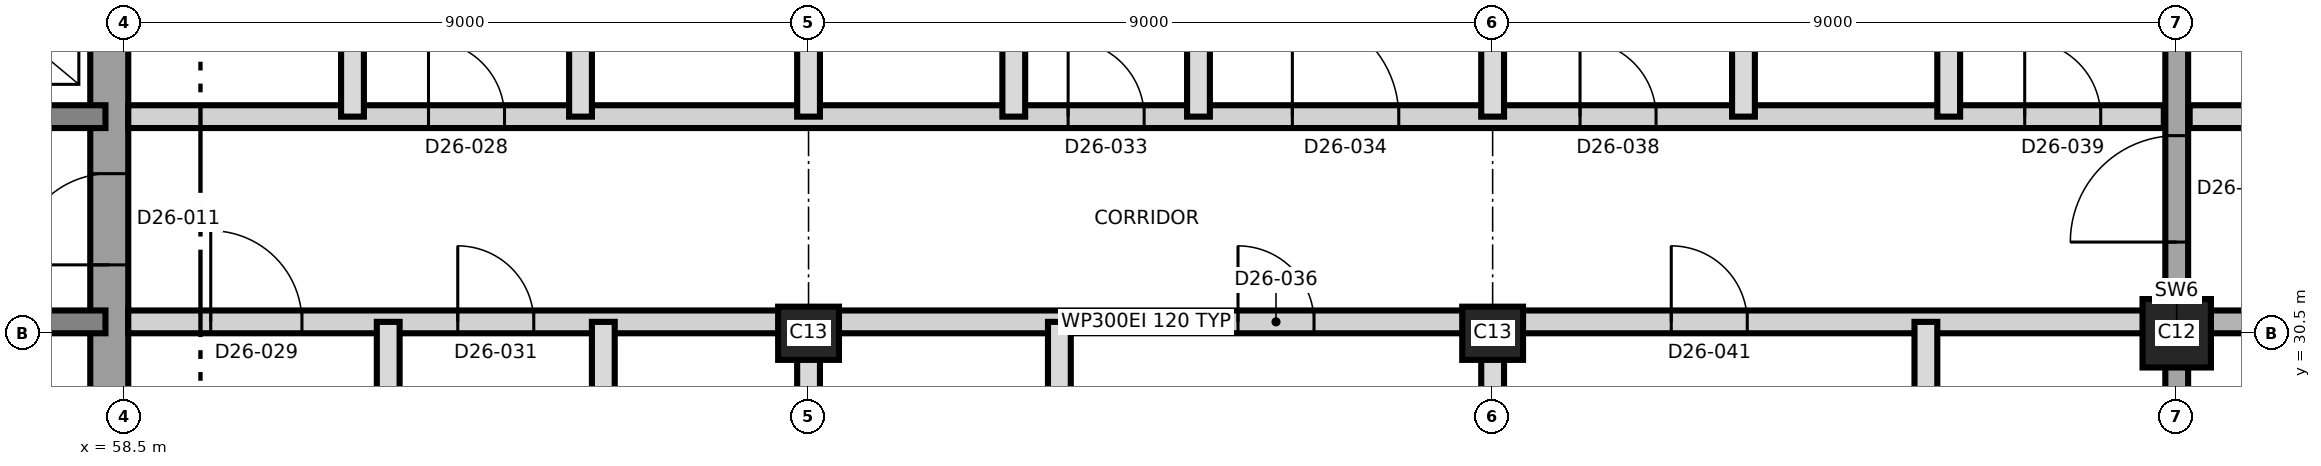
"""IFC4 building model, lengths in metres.
Left out: names, types, materials, properties, quantities, classifications, styles, units other than length and angle.
Written with IfcOpenShell. Run it as: python <this file> out.ifc"""

import sys

from ifc_helpers import new_model, si_unit, direction, frame, frame_2d, origin, origin_2d, place, context, subcontext, project, spatial, rectangle, extrude, element, fill, save


model = new_model("IFC4")
c1 = context("Model", 3, precision=1e-05, world=origin(), true_north=direction((0.0, 1.0)))
c2 = subcontext(c1, "Body", "Model", "MODEL_VIEW")
j1 = project(units=[si_unit("LENGTHUNIT", "METRE"), si_unit("PLANEANGLEUNIT", "RADIAN")], contexts=[c1])
p1 = place(None, origin())
s1 = spatial("IfcSite", under=j1, at=p1, CompositionType="ELEMENT")
p2 = place(p1, origin())
s2 = spatial("IfcBuilding", under=s1, at=p2, CompositionType="ELEMENT")
p3 = place(p2, frame((0.0, 0.0, 232.8)))
s3 = spatial("IfcBuildingStorey", under=s2, at=p3, CompositionType="ELEMENT", Elevation=232.8)
p4 = place(p3, frame((58.3, 21.25, 0.0), z_axis=(0.0, 0.0, 1.0), x_axis=(0.0, 1.0, 0.0)))
e1 = element("IfcWall", 1, at=p4, inside=s3, PredefinedType="SHEAR", context=c2, shape_type="SweptSolid", body=[
    extrude(rectangle(XDim=18.5, YDim=0.5, at=frame_2d((9.25, 0.0))), origin(), (0.0, 0.0, 1.0), 3.7),
])
p5 = place(p4, frame((10.15, 0.0, 0.0)))
e2 = element("IfcOpeningElement", 2, at=p5, cuts=e1, PredefinedType="OPENING", context=c2, shape_type="SweptSolid", body=[
    extrude(rectangle(XDim=1.2, YDim=2.1, at=frame_2d((0.6, 1.05))), frame((0.0, 0.26, 0.0), z_axis=(0.0, -1.0, 0.0), x_axis=(1.0, 0.0, 0.0)), (0.0, 0.0, 1.0), 0.52),
])
p6 = place(p3, frame((31.75, 30.65, 0.0), z_axis=(0.0, 0.0, 1.0), x_axis=(1.0, 0.0, 0.0)))
e3 = element("IfcWall", 3, at=p6, inside=s3, PredefinedType="SHEAR", context=c2, shape_type="SweptSolid", body=[
    extrude(rectangle(XDim=26.5, YDim=0.3, at=frame_2d((13.25, 0.0))), origin(), (0.0, 0.0, 1.0), 3.7),
])
p7 = place(p6, frame((24.75, 0.0, 0.0)))
e4 = element("IfcOpeningElement", 4, at=p7, cuts=e3, PredefinedType="OPENING", context=c2, shape_type="SweptSolid", body=[
    extrude(rectangle(XDim=1.0, YDim=2.1, at=frame_2d((0.5, 1.05))), frame((0.0, 0.16, 0.0), z_axis=(0.0, -1.0, 0.0), x_axis=(1.0, 0.0, 0.0)), (0.0, 0.0, 1.0), 0.32),
])
p8 = place(p3, frame((31.75, 33.35, 0.0), z_axis=(0.0, 0.0, 1.0), x_axis=(1.0, 0.0, 0.0)))
e5 = element("IfcWall", 5, at=p8, inside=s3, PredefinedType="SHEAR", context=c2, shape_type="SweptSolid", body=[
    extrude(rectangle(XDim=26.5, YDim=0.3, at=frame_2d((13.25, 0.0))), origin(), (0.0, 0.0, 1.0), 3.7),
])
p9 = place(p8, frame((13.9, 0.0, 0.0)))
e6 = element("IfcOpeningElement", 6, at=p9, cuts=e5, PredefinedType="OPENING", context=c2, shape_type="SweptSolid", body=[
    extrude(rectangle(XDim=1.4, YDim=2.1, at=frame_2d((0.7, 1.05))), frame((0.0, 0.16, 0.0), z_axis=(0.0, -1.0, 0.0), x_axis=(1.0, 0.0, 0.0)), (0.0, 0.0, 1.0), 0.32),
])
p10 = place(p8, frame((5.375, 0.0, 0.0)))
e7 = element("IfcOpeningElement", 7, at=p10, cuts=e5, PredefinedType="OPENING", context=c2, shape_type="SweptSolid", body=[
    extrude(rectangle(XDim=1.2, YDim=2.1, at=frame_2d((0.6, 1.05))), frame((0.0, 0.16, 0.0), z_axis=(0.0, -1.0, 0.0), x_axis=(1.0, 0.0, 0.0)), (0.0, 0.0, 1.0), 0.32),
])
p11 = place(p8, frame((19.925, 0.0, 0.0)))
e8 = element("IfcOpeningElement", 8, at=p11, cuts=e5, PredefinedType="OPENING", context=c2, shape_type="SweptSolid", body=[
    extrude(rectangle(XDim=1.2, YDim=2.1, at=frame_2d((0.6, 1.05))), frame((0.0, 0.16, 0.0), z_axis=(0.0, -1.0, 0.0), x_axis=(1.0, 0.0, 0.0)), (0.0, 0.0, 1.0), 0.32),
])
for number, where, z_axis, x_axis in (
    (9, (67.5, 30.5, 0.0), (0.0, 0.0, 1.0), (1.0, 0.0, 0.0)),
    (10, (76.5, 30.5, 0.0), (0.0, 0.0, 1.0), (1.0, 0.0, 0.0)),
):
    element("IfcColumn", number, at=place(p3, frame(where, z_axis=z_axis, x_axis=x_axis)), inside=s3, PredefinedType="COLUMN", context=c2, shape_type="SweptSolid", body=[
        extrude(rectangle(XDim=0.8, YDim=0.7, at=origin_2d()), origin(), (0.0, 0.0, 1.0), 3.7),
    ])
p12 = place(p3, frame((85.5, 30.5, 0.0), z_axis=(0.0, 0.0, 1.0), x_axis=(1.0, 0.0, 0.0)))
e11 = element("IfcColumn", 11, at=p12, inside=s3, PredefinedType="COLUMN", context=c2, shape_type="SweptSolid", body=[
    extrude(rectangle(XDim=0.9, YDim=0.9, at=origin_2d()), origin(), (0.0, 0.0, 1.0), 3.7),
])
p13 = place(p3, frame((85.5, 19.275, 0.0), z_axis=(0.0, 0.0, 1.0), x_axis=(0.0, 1.0, 0.0)))
e12 = element("IfcWall", 12, at=p13, inside=s3, PredefinedType="SHEAR", context=c2, shape_type="SweptSolid", body=[
    extrude(rectangle(XDim=22.45, YDim=0.3, at=frame_2d((11.225, 0.0))), origin(), (0.0, 0.0, 1.0), 3.7),
])
p14 = place(p13, frame((12.425, 0.0, 0.0)))
e13 = element("IfcOpeningElement", 13, at=p14, cuts=e12, PredefinedType="OPENING", context=c2, shape_type="SweptSolid", body=[
    extrude(rectangle(XDim=1.4, YDim=2.1, at=frame_2d((0.7, 1.05))), frame((0.0, 0.16, 0.0), z_axis=(0.0, -1.0, 0.0), x_axis=(1.0, 0.0, 0.0)), (0.0, 0.0, 1.0), 0.32),
])
p15 = place(p3, frame((58.55, 30.65, 0.0), z_axis=(0.0, 0.0, 1.0), x_axis=(1.0, 0.0, 0.0)))
e14 = element("IfcWall", 14, at=p15, inside=s3, PredefinedType="PARTITIONING", context=c2, shape_type="SweptSolid", body=[
    extrude(rectangle(XDim=26.78, YDim=0.3, at=frame_2d((13.39, 0.0))), origin(), (0.0, 0.0, 1.0), 3.4),
])
p16 = place(p15, frame((1.085, 0.0, 0.0)))
e15 = element("IfcOpeningElement", 15, at=p16, cuts=e14, PredefinedType="OPENING", context=c2, shape_type="SweptSolid", body=[
    extrude(rectangle(XDim=1.2, YDim=2.1, at=frame_2d((0.6, 1.05))), frame((0.0, 0.16, 0.0), z_axis=(0.0, -1.0, 0.0), x_axis=(1.0, 0.0, 0.0)), (0.0, 0.0, 1.0), 0.32),
])
p17 = place(p15, frame((4.335, 0.0, 0.0)))
e16 = element("IfcOpeningElement", 16, at=p17, cuts=e14, PredefinedType="OPENING", context=c2, shape_type="SweptSolid", body=[
    extrude(rectangle(XDim=1.0, YDim=2.1, at=frame_2d((0.5, 1.05))), frame((0.0, 0.16, 0.0), z_axis=(0.0, -1.0, 0.0), x_axis=(1.0, 0.0, 0.0)), (0.0, 0.0, 1.0), 0.32),
])
p18 = place(p15, frame((14.6, 0.0, 0.0)))
e17 = element("IfcOpeningElement", 17, at=p18, cuts=e14, PredefinedType="OPENING", context=c2, shape_type="SweptSolid", body=[
    extrude(rectangle(XDim=1.0, YDim=2.4, at=frame_2d((0.5, 1.2))), frame((0.0, 0.16, 0.0), z_axis=(0.0, -1.0, 0.0), x_axis=(1.0, 0.0, 0.0)), (0.0, 0.0, 1.0), 0.32),
])
p19 = place(p15, frame((20.3, 0.0, 0.0)))
e18 = element("IfcOpeningElement", 18, at=p19, cuts=e14, PredefinedType="OPENING", context=c2, shape_type="SweptSolid", body=[
    extrude(rectangle(XDim=1.0, YDim=2.4, at=frame_2d((0.5, 1.2))), frame((0.0, 0.16, 0.0), z_axis=(0.0, -1.0, 0.0), x_axis=(1.0, 0.0, 0.0)), (0.0, 0.0, 1.0), 0.32),
])
p20 = place(p3, frame((85.67, 30.65, 0.0), z_axis=(0.0, 0.0, 1.0), x_axis=(1.0, 0.0, 0.0)))
e19 = element("IfcWall", 19, at=p20, inside=s3, PredefinedType="SHEAR", context=c2, shape_type="SweptSolid", body=[
    extrude(rectangle(XDim=9.58, YDim=0.3, at=frame_2d((4.79, 0.0))), origin(), (0.0, 0.0, 1.0), 3.4),
])
p21 = place(p20, frame((2.08, 0.0, 0.0)))
e20 = element("IfcOpeningElement", 20, at=p21, cuts=e19, PredefinedType="OPENING", context=c2, shape_type="SweptSolid", body=[
    extrude(rectangle(XDim=1.2, YDim=2.1, at=frame_2d((0.6, 1.05))), frame((0.0, 0.16, 0.0), z_axis=(0.0, -1.0, 0.0), x_axis=(1.0, 0.0, 0.0)), (0.0, 0.0, 1.0), 0.32),
])
p22 = place(p20, frame((5.63, 0.0, 0.0)))
e21 = element("IfcOpeningElement", 21, at=p22, cuts=e19, PredefinedType="OPENING", context=c2, shape_type="SweptSolid", body=[
    extrude(rectangle(XDim=1.0, YDim=2.1, at=frame_2d((0.5, 1.05))), frame((0.0, 0.16, 0.0), z_axis=(0.0, -1.0, 0.0), x_axis=(1.0, 0.0, 0.0)), (0.0, 0.0, 1.0), 0.32),
])
p23 = place(p3, frame((58.55, 33.35, 0.0), z_axis=(0.0, 0.0, 1.0), x_axis=(1.0, 0.0, 0.0)))
e22 = element("IfcWall", 22, at=p23, inside=s3, PredefinedType="PARTITIONING", context=c2, shape_type="SweptSolid", body=[
    extrude(rectangle(XDim=26.78, YDim=0.3, at=frame_2d((13.39, 0.0))), origin(), (0.0, 0.0, 1.0), 3.4),
])
p24 = place(p23, frame((3.95, 0.0, 0.0)))
e23 = element("IfcOpeningElement", 23, at=p24, cuts=e22, PredefinedType="OPENING", context=c2, shape_type="SweptSolid", body=[
    extrude(rectangle(XDim=1.0, YDim=2.4, at=frame_2d((0.5, 1.2))), frame((0.0, 0.16, 0.0), z_axis=(0.0, -1.0, 0.0), x_axis=(1.0, 0.0, 0.0)), (0.0, 0.0, 1.0), 0.32),
])
p25 = place(p23, frame((12.365, 0.0, 0.0)))
e24 = element("IfcOpeningElement", 24, at=p25, cuts=e22, PredefinedType="OPENING", context=c2, shape_type="SweptSolid", body=[
    extrude(rectangle(XDim=1.0, YDim=2.1, at=frame_2d((0.5, 1.05))), frame((0.0, 0.16, 0.0), z_axis=(0.0, -1.0, 0.0), x_axis=(1.0, 0.0, 0.0)), (0.0, 0.0, 1.0), 0.32),
])
p26 = place(p23, frame((15.315, 0.0, 0.0)))
e25 = element("IfcOpeningElement", 25, at=p26, cuts=e22, PredefinedType="OPENING", context=c2, shape_type="SweptSolid", body=[
    extrude(rectangle(XDim=1.4, YDim=2.1, at=frame_2d((0.7, 1.05))), frame((0.0, 0.16, 0.0), z_axis=(0.0, -1.0, 0.0), x_axis=(1.0, 0.0, 0.0)), (0.0, 0.0, 1.0), 0.32),
])
p27 = place(p23, frame((19.1, 0.0, 0.0)))
e26 = element("IfcOpeningElement", 26, at=p27, cuts=e22, PredefinedType="OPENING", context=c2, shape_type="SweptSolid", body=[
    extrude(rectangle(XDim=1.0, YDim=2.1, at=frame_2d((0.5, 1.05))), frame((0.0, 0.16, 0.0), z_axis=(0.0, -1.0, 0.0), x_axis=(1.0, 0.0, 0.0)), (0.0, 0.0, 1.0), 0.32),
])
p28 = place(p23, frame((24.95, 0.0, 0.0)))
e27 = element("IfcOpeningElement", 27, at=p28, cuts=e22, PredefinedType="OPENING", context=c2, shape_type="SweptSolid", body=[
    extrude(rectangle(XDim=1.0, YDim=2.1, at=frame_2d((0.5, 1.05))), frame((0.0, 0.16, 0.0), z_axis=(0.0, -1.0, 0.0), x_axis=(1.0, 0.0, 0.0)), (0.0, 0.0, 1.0), 0.32),
])
p29 = place(p3, frame((85.67, 33.35, 0.0), z_axis=(0.0, 0.0, 1.0), x_axis=(1.0, 0.0, 0.0)))
e28 = element("IfcWall", 28, at=p29, inside=s3, PredefinedType="PARTITIONING", context=c2, shape_type="SweptSolid", body=[
    extrude(rectangle(XDim=9.58, YDim=0.3, at=frame_2d((4.79, 0.0))), origin(), (0.0, 0.0, 1.0), 3.4),
])
p30 = place(p29, frame((1.83, 0.0, 0.0)))
e29 = element("IfcOpeningElement", 29, at=p30, cuts=e28, PredefinedType="OPENING", context=c2, shape_type="SweptSolid", body=[
    extrude(rectangle(XDim=1.0, YDim=2.1, at=frame_2d((0.5, 1.05))), frame((0.0, 0.16, 0.0), z_axis=(0.0, -1.0, 0.0), x_axis=(1.0, 0.0, 0.0)), (0.0, 0.0, 1.0), 0.32),
])
p31 = place(p29, frame((5.63, 0.0, 0.0)))
e30 = element("IfcOpeningElement", 30, at=p31, cuts=e28, PredefinedType="OPENING", context=c2, shape_type="SweptSolid", body=[
    extrude(rectangle(XDim=1.0, YDim=2.1, at=frame_2d((0.5, 1.05))), frame((0.0, 0.16, 0.0), z_axis=(0.0, -1.0, 0.0), x_axis=(1.0, 0.0, 0.0)), (0.0, 0.0, 1.0), 0.32),
])
p32 = place(p3, frame((61.5, 33.35, 0.0), z_axis=(0.0, 0.0, 1.0), x_axis=(0.0, 1.0, 0.0)))
e31 = element("IfcWall", 31, at=p32, inside=s3, PredefinedType="PARTITIONING", context=c2, shape_type="SweptSolid", body=[
    extrude(rectangle(XDim=3.3, YDim=0.3, at=frame_2d((1.65, 0.0))), origin(), (0.0, 0.0, 1.0), 3.4),
])
p33 = place(p3, frame((61.97, 19.275, 0.0), z_axis=(0.0, 0.0, 1.0), x_axis=(0.0, 1.0, 0.0)))
e32 = element("IfcWall", 32, at=p33, inside=s3, PredefinedType="PARTITIONING", context=c2, shape_type="SweptSolid", body=[
    extrude(rectangle(XDim=11.375, YDim=0.3, at=frame_2d((5.688, 0.0))), origin(), (0.0, 0.0, 1.0), 3.4),
])
p34 = place(p3, frame((64.5, 33.35, 0.0), z_axis=(0.0, 0.0, 1.0), x_axis=(0.0, 1.0, 0.0)))
e33 = element("IfcWall", 33, at=p34, inside=s3, PredefinedType="PARTITIONING", context=c2, shape_type="SweptSolid", body=[
    extrude(rectangle(XDim=3.3, YDim=0.3, at=frame_2d((1.65, 0.0))), origin(), (0.0, 0.0, 1.0), 3.4),
])
p35 = place(p3, frame((64.8, 27.45, 0.0), z_axis=(0.0, 0.0, 1.0), x_axis=(0.0, 1.0, 0.0)))
e34 = element("IfcWall", 34, at=p35, inside=s3, PredefinedType="PARTITIONING", context=c2, shape_type="SweptSolid", body=[
    extrude(rectangle(XDim=3.2, YDim=0.3, at=frame_2d((1.6, 0.0))), origin(), (0.0, 0.0, 1.0), 3.4),
])
p36 = place(p3, frame((67.5, 19.275, 0.0), z_axis=(0.0, 0.0, 1.0), x_axis=(0.0, 1.0, 0.0)))
e35 = element("IfcWall", 35, at=p36, inside=s3, PredefinedType="PARTITIONING", context=c2, shape_type="SweptSolid", body=[
    extrude(rectangle(XDim=11.375, YDim=0.3, at=frame_2d((5.688, 0.0))), origin(), (0.0, 0.0, 1.0), 3.4),
])
p37 = place(p3, frame((67.5, 33.35, 0.0), z_axis=(0.0, 0.0, 1.0), x_axis=(0.0, 1.0, 0.0)))
e36 = element("IfcWall", 36, at=p37, inside=s3, PredefinedType="PARTITIONING", context=c2, shape_type="SweptSolid", body=[
    extrude(rectangle(XDim=8.555, YDim=0.3, at=frame_2d((4.277, 0.0))), origin(), (0.0, 0.0, 1.0), 3.4),
])
p38 = place(p3, frame((70.2, 33.35, 0.0), z_axis=(0.0, 0.0, 1.0), x_axis=(0.0, 1.0, 0.0)))
e37 = element("IfcWall", 37, at=p38, inside=s3, PredefinedType="PARTITIONING", context=c2, shape_type="SweptSolid", body=[
    extrude(rectangle(XDim=3.2, YDim=0.3, at=frame_2d((1.6, 0.0))), origin(), (0.0, 0.0, 1.0), 3.4),
])
p39 = place(p3, frame((70.8, 27.15, 0.0), z_axis=(0.0, 0.0, 1.0), x_axis=(0.0, 1.0, 0.0)))
e38 = element("IfcWall", 38, at=p39, inside=s3, PredefinedType="PARTITIONING", context=c2, shape_type="SweptSolid", body=[
    extrude(rectangle(XDim=3.5, YDim=0.3, at=frame_2d((1.75, 0.0))), origin(), (0.0, 0.0, 1.0), 3.4),
])
p40 = place(p3, frame((72.63, 33.35, 0.0), z_axis=(0.0, 0.0, 1.0), x_axis=(0.0, 1.0, 0.0)))
e39 = element("IfcWall", 39, at=p40, inside=s3, PredefinedType="PARTITIONING", context=c2, shape_type="SweptSolid", body=[
    extrude(rectangle(XDim=8.555, YDim=0.3, at=frame_2d((4.277, 0.0))), origin(), (0.0, 0.0, 1.0), 3.4),
])
p41 = place(p3, frame((76.5, 19.275, 0.0), z_axis=(0.0, 0.0, 1.0), x_axis=(0.0, 1.0, 0.0)))
e40 = element("IfcWall", 40, at=p41, inside=s3, PredefinedType="PARTITIONING", context=c2, shape_type="SweptSolid", body=[
    extrude(rectangle(XDim=11.375, YDim=0.3, at=frame_2d((5.688, 0.0))), origin(), (0.0, 0.0, 1.0), 3.4),
])
p42 = place(p3, frame((76.5, 33.35, 0.0), z_axis=(0.0, 0.0, 1.0), x_axis=(0.0, 1.0, 0.0)))
e41 = element("IfcWall", 41, at=p42, inside=s3, PredefinedType="PARTITIONING", context=c2, shape_type="SweptSolid", body=[
    extrude(rectangle(XDim=8.555, YDim=0.3, at=frame_2d((4.277, 0.0))), origin(), (0.0, 0.0, 1.0), 3.4),
])
p43 = place(p3, frame((79.8, 33.35, 0.0), z_axis=(0.0, 0.0, 1.0), x_axis=(0.0, 1.0, 0.0)))
e42 = element("IfcWall", 42, at=p43, inside=s3, PredefinedType="PARTITIONING", context=c2, shape_type="SweptSolid", body=[
    extrude(rectangle(XDim=3.2, YDim=0.3, at=frame_2d((1.6, 0.0))), origin(), (0.0, 0.0, 1.0), 3.4),
])
p44 = place(p3, frame((82.2, 27.15, 0.0), z_axis=(0.0, 0.0, 1.0), x_axis=(0.0, 1.0, 0.0)))
e43 = element("IfcWall", 43, at=p44, inside=s3, PredefinedType="PARTITIONING", context=c2, shape_type="SweptSolid", body=[
    extrude(rectangle(XDim=3.5, YDim=0.3, at=frame_2d((1.75, 0.0))), origin(), (0.0, 0.0, 1.0), 3.4),
])
p45 = place(p3, frame((82.5, 33.35, 0.0), z_axis=(0.0, 0.0, 1.0), x_axis=(0.0, 1.0, 0.0)))
e44 = element("IfcWall", 44, at=p45, inside=s3, PredefinedType="PARTITIONING", context=c2, shape_type="SweptSolid", body=[
    extrude(rectangle(XDim=8.555, YDim=0.3, at=frame_2d((4.277, 0.0))), origin(), (0.0, 0.0, 1.0), 3.4),
])
p46 = place(p5, origin())
e45 = element("IfcDoor", 45, at=p46, inside=s3, OperationType="SINGLE_SWING_LEFT", PredefinedType="DOOR", context=c2, shape_type="SweptSolid", body=[
    extrude(rectangle(XDim=1.2, YDim=2.1, at=frame_2d((0.6, 1.05))), frame((0.0, 0.025, 0.0), z_axis=(0.0, -1.0, 0.0), x_axis=(1.0, 0.0, 0.0)), (0.0, 0.0, 1.0), 0.05),
])
fill(e2, e45)
p47 = place(p24, origin())
e46 = element("IfcDoor", 46, at=p47, inside=s3, OperationType="SINGLE_SWING_LEFT", PredefinedType="DOOR", context=c2, shape_type="SweptSolid", body=[
    extrude(rectangle(XDim=1.0, YDim=2.4, at=frame_2d((0.5, 1.2))), frame((0.0, 0.025, 0.0), z_axis=(0.0, -1.0, 0.0), x_axis=(1.0, 0.0, 0.0)), (0.0, 0.0, 1.0), 0.05),
])
fill(e23, e46)
p48 = place(p16, origin())
e47 = element("IfcDoor", 47, at=p48, inside=s3, OperationType="SINGLE_SWING_LEFT", PredefinedType="DOOR", context=c2, shape_type="SweptSolid", body=[
    extrude(rectangle(XDim=1.2, YDim=2.1, at=frame_2d((0.6, 1.05))), frame((0.0, 0.025, 0.0), z_axis=(0.0, -1.0, 0.0), x_axis=(1.0, 0.0, 0.0)), (0.0, 0.0, 1.0), 0.05),
])
fill(e15, e47)
p49 = place(p17, origin())
e48 = element("IfcDoor", 48, at=p49, inside=s3, OperationType="SINGLE_SWING_LEFT", PredefinedType="DOOR", context=c2, shape_type="SweptSolid", body=[
    extrude(rectangle(XDim=1.0, YDim=2.1, at=frame_2d((0.5, 1.05))), frame((0.0, 0.025, 0.0), z_axis=(0.0, -1.0, 0.0), x_axis=(1.0, 0.0, 0.0)), (0.0, 0.0, 1.0), 0.05),
])
fill(e16, e48)
p50 = place(p25, origin())
e49 = element("IfcDoor", 49, at=p50, inside=s3, OperationType="SINGLE_SWING_LEFT", PredefinedType="DOOR", context=c2, shape_type="SweptSolid", body=[
    extrude(rectangle(XDim=1.0, YDim=2.1, at=frame_2d((0.5, 1.05))), frame((0.0, 0.025, 0.0), z_axis=(0.0, -1.0, 0.0), x_axis=(1.0, 0.0, 0.0)), (0.0, 0.0, 1.0), 0.05),
])
fill(e24, e49)
p51 = place(p26, origin())
e50 = element("IfcDoor", 50, at=p51, inside=s3, OperationType="SINGLE_SWING_RIGHT", PredefinedType="DOOR", context=c2, shape_type="SweptSolid", body=[
    extrude(rectangle(XDim=1.4, YDim=2.1, at=frame_2d((0.7, 1.05))), frame((0.0, 0.025, 0.0), z_axis=(0.0, -1.0, 0.0), x_axis=(1.0, 0.0, 0.0)), (0.0, 0.0, 1.0), 0.05),
])
fill(e25, e50)
p52 = place(p18, origin())
e51 = element("IfcDoor", 51, at=p52, inside=s3, OperationType="SINGLE_SWING_LEFT", PredefinedType="DOOR", context=c2, shape_type="SweptSolid", body=[
    extrude(rectangle(XDim=1.0, YDim=2.4, at=frame_2d((0.5, 1.2))), frame((0.0, 0.025, 0.0), z_axis=(0.0, -1.0, 0.0), x_axis=(1.0, 0.0, 0.0)), (0.0, 0.0, 1.0), 0.05),
])
fill(e17, e51)
p53 = place(p27, origin())
e52 = element("IfcDoor", 52, at=p53, inside=s3, OperationType="SINGLE_SWING_RIGHT", PredefinedType="DOOR", context=c2, shape_type="SweptSolid", body=[
    extrude(rectangle(XDim=1.0, YDim=2.1, at=frame_2d((0.5, 1.05))), frame((0.0, 0.025, 0.0), z_axis=(0.0, -1.0, 0.0), x_axis=(1.0, 0.0, 0.0)), (0.0, 0.0, 1.0), 0.05),
])
fill(e26, e52)
p54 = place(p28, origin())
e53 = element("IfcDoor", 53, at=p54, inside=s3, OperationType="SINGLE_SWING_LEFT", PredefinedType="DOOR", context=c2, shape_type="SweptSolid", body=[
    extrude(rectangle(XDim=1.0, YDim=2.1, at=frame_2d((0.5, 1.05))), frame((0.0, 0.025, 0.0), z_axis=(0.0, -1.0, 0.0), x_axis=(1.0, 0.0, 0.0)), (0.0, 0.0, 1.0), 0.05),
])
fill(e27, e53)
p55 = place(p19, origin())
e54 = element("IfcDoor", 54, at=p55, inside=s3, OperationType="SINGLE_SWING_RIGHT", PredefinedType="DOOR", context=c2, shape_type="SweptSolid", body=[
    extrude(rectangle(XDim=1.0, YDim=2.4, at=frame_2d((0.5, 1.2))), frame((0.0, 0.025, 0.0), z_axis=(0.0, -1.0, 0.0), x_axis=(1.0, 0.0, 0.0)), (0.0, 0.0, 1.0), 0.05),
])
fill(e18, e54)
p56 = place(p14, origin())
e55 = element("IfcDoor", 55, at=p56, inside=s3, OperationType="SINGLE_SWING_RIGHT", PredefinedType="DOOR", context=c2, shape_type="SweptSolid", body=[
    extrude(rectangle(XDim=1.4, YDim=2.1, at=frame_2d((0.7, 1.05))), frame((0.0, 0.025, 0.0), z_axis=(0.0, -1.0, 0.0), x_axis=(1.0, 0.0, 0.0)), (0.0, 0.0, 1.0), 0.05),
])
fill(e13, e55)
save(model, sys.argv[1])
